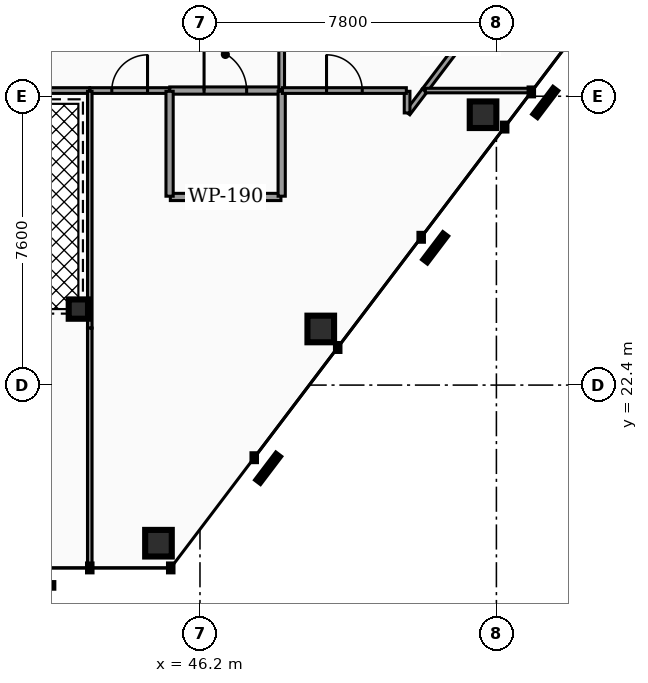
"""IFC4 building model, lengths in metres.
Left out: names, types, materials, properties, quantities, classifications, styles, units other than length and angle.
Written with IfcOpenShell. Run it as: python <this file> out.ifc"""

import sys

from ifc_helpers import new_model, si_unit, direction, frame, frame_2d, origin, origin_2d, place, context, subcontext, project, spatial, rectangle, hollow_rectangle, hollow_circle, extrude, element, fill, save


model = new_model("IFC4")
c1 = context("Model", 3, precision=1e-05, world=origin(), true_north=direction((0.0, 1.0)))
c2 = subcontext(c1, "Body", "Model", "MODEL_VIEW")
j1 = project(units=[si_unit("LENGTHUNIT", "METRE"), si_unit("PLANEANGLEUNIT", "RADIAN")], contexts=[c1])
p1 = place(None, origin())
s1 = spatial("IfcSite", under=j1, at=p1, CompositionType="ELEMENT")
p2 = place(p1, origin())
s2 = spatial("IfcBuilding", under=s1, at=p2, CompositionType="ELEMENT")
p3 = place(p2, frame((0.0, 0.0, 187.0)))
s3 = spatial("IfcBuildingStorey", under=s2, at=p3, CompositionType="ELEMENT", Elevation=187.0)
for number, where, z_axis, x_axis in (
    (1, (45.108, 18.239, 0.0), (0.0, 0.0, 1.0), (1.0, 0.0, 0.0)),
    (2, (49.378, 23.876, 0.0), (0.0, 0.0, 1.0), (1.0, 0.0, 0.0)),
    (3, (53.649, 29.514, 0.0), (0.0, 0.0, 1.0), (1.0, 0.0, 0.0)),
):
    element("IfcColumn", number, at=place(p3, frame(where, z_axis=z_axis, x_axis=x_axis)), inside=s3, PredefinedType="COLUMN", context=c2, shape_type="SweptSolid", body=[
        extrude(hollow_rectangle(XDim=0.7, YDim=0.7, WallThickness=0.035, at=origin_2d()), origin(), (0.0, 0.0, 1.0), 3.5),
    ])
p4 = place(p3, frame((43.0, 24.4, 0.0), z_axis=(0.0, 0.0, 1.0), x_axis=(1.0, 0.0, 0.0)))
e4 = element("IfcColumn", 4, at=p4, inside=s3, PredefinedType="COLUMN", context=c2, shape_type="SweptSolid", body=[
    extrude(hollow_circle(Radius=0.254, WallThickness=0.02, at=origin_2d()), origin(), (0.0, 0.0, 1.0), 3.5),
])
p5 = place(p3, frame((45.405, 30.15, 0.0), z_axis=(0.0, 0.0, 1.0), x_axis=(1.0, 0.0, 0.0)))
e5 = element("IfcWall", 5, at=p5, inside=s3, PredefinedType="PARTITIONING", context=c2, shape_type="SweptSolid", body=[
    extrude(rectangle(XDim=2.925, YDim=0.19, at=frame_2d((1.462, 0.0))), origin(), (0.0, 0.0, 1.0), 2.457),
])
p6 = place(p5, frame((0.903, 0.0, 0.0)))
e6 = element("IfcOpeningElement", 6, at=p6, cuts=e5, PredefinedType="OPENING", context=c2, shape_type="SweptSolid", body=[
    extrude(rectangle(XDim=1.12, YDim=2.05, at=frame_2d((0.56, 1.025))), frame((0.0, 0.105, 0.0), z_axis=(0.0, -1.0, 0.0), x_axis=(1.0, 0.0, 0.0)), (0.0, 0.0, 1.0), 0.21),
])
p7 = place(p3, frame((48.35, 30.17, 0.0), z_axis=(0.0, 0.0, 1.0), x_axis=(0.0, 1.0, 0.0)))
e7 = element("IfcWall", 7, at=p7, inside=s3, PredefinedType="PARTITIONING", context=c2, shape_type="SweptSolid", body=[
    extrude(rectangle(XDim=3.06, YDim=0.15, at=frame_2d((1.53, 0.0))), origin(), (0.0, 0.0, 1.0), 2.457),
])
p8 = place(p7, frame((1.06, 0.0, 0.0)))
e8 = element("IfcOpeningElement", 8, at=p8, cuts=e7, PredefinedType="OPENING", context=c2, shape_type="SweptSolid", body=[
    extrude(rectangle(XDim=0.94, YDim=2.05, at=frame_2d((0.47, 1.025))), frame((0.0, 0.085, 0.0), z_axis=(0.0, -1.0, 0.0), x_axis=(1.0, 0.0, 0.0)), (0.0, 0.0, 1.0), 0.17),
])
p9 = place(p3, frame((35.385, 30.15, 0.0), z_axis=(0.0, 0.0, 1.0), x_axis=(1.0, 0.0, 0.0)))
e9 = element("IfcWall", 9, at=p9, inside=s3, PredefinedType="PARTITIONING", context=c2, shape_type="SweptSolid", body=[
    extrude(rectangle(XDim=7.91, YDim=0.15, at=frame_2d((3.955, 0.0))), origin(), (0.0, 0.0, 1.0), 2.457),
])
p10 = place(p9, frame((0.25, 0.0, 0.0)))
e10 = element("IfcOpeningElement", 10, at=p10, cuts=e9, PredefinedType="OPENING", context=c2, shape_type="SweptSolid", body=[
    extrude(rectangle(XDim=0.88, YDim=2.05, at=frame_2d((0.44, 1.025))), frame((0.0, 0.085, 0.0), z_axis=(0.0, -1.0, 0.0), x_axis=(1.0, 0.0, 0.0)), (0.0, 0.0, 1.0), 0.17),
])
p11 = place(p3, frame((43.305, 30.15, 0.0), z_axis=(0.0, 0.0, 1.0), x_axis=(1.0, 0.0, 0.0)))
e11 = element("IfcWall", 11, at=p11, inside=s3, PredefinedType="PARTITIONING", context=c2, shape_type="SweptSolid", body=[
    extrude(rectangle(XDim=2.09, YDim=0.15, at=frame_2d((1.045, 0.0))), origin(), (0.0, 0.0, 1.0), 2.457),
])
p12 = place(p11, frame((0.575, 0.0, 0.0)))
e12 = element("IfcOpeningElement", 12, at=p12, cuts=e11, PredefinedType="OPENING", context=c2, shape_type="SweptSolid", body=[
    extrude(rectangle(XDim=0.94, YDim=2.05, at=frame_2d((0.47, 1.025))), frame((0.0, 0.085, 0.0), z_axis=(0.0, -1.0, 0.0), x_axis=(1.0, 0.0, 0.0)), (0.0, 0.0, 1.0), 0.17),
])
p13 = place(p3, frame((45.42, 27.35, 0.0), z_axis=(0.0, 0.0, 1.0), x_axis=(1.0, 0.0, 0.0)))
e13 = element("IfcWall", 13, at=p13, inside=s3, PredefinedType="PARTITIONING", context=c2, shape_type="SweptSolid", body=[
    extrude(rectangle(XDim=2.91, YDim=0.19, at=frame_2d((1.455, 0.0))), origin(), (0.0, 0.0, 1.0), 2.457),
])
for number, where, z_axis, x_axis in (
    (14, (45.4, 27.37, 0.0), (0.0, 0.0, 1.0), (0.0, 1.0, 0.0)),
    (15, (48.35, 27.37, 0.0), (0.0, 0.0, 1.0), (0.0, 1.0, 0.0)),
):
    element("IfcWall", number, at=place(p3, frame(where, z_axis=z_axis, x_axis=x_axis)), inside=s3, PredefinedType="PARTITIONING", context=c2, shape_type="SweptSolid", body=[
        extrude(rectangle(XDim=2.76, YDim=0.19, at=frame_2d((1.38, 0.0))), origin(), (0.0, 0.0, 1.0), 2.457),
    ])
p14 = place(p3, frame((51.662, 29.557, 0.0), z_axis=(0.0, 0.0, 1.0), x_axis=(0.603572672845, 0.797307988543, 0.0)))
e16 = element("IfcWall", 16, at=p14, inside=s3, PredefinedType="PARTITIONING", context=c2, shape_type="SweptSolid", body=[
    extrude(rectangle(XDim=0.742, YDim=0.15, at=frame_2d((0.371, 0.0))), origin(), (0.0, 0.0, 1.0), 2.457),
])
p15 = place(p3, frame((51.65, 29.562, 0.0), z_axis=(0.0, 0.0, 1.0), x_axis=(0.0, 1.0, 0.0)))
e17 = element("IfcWall", 17, at=p15, inside=s3, PredefinedType="PARTITIONING", context=c2, shape_type="SweptSolid", body=[
    extrude(rectangle(XDim=0.568, YDim=0.15, at=frame_2d((0.284, 0.0))), origin(), (0.0, 0.0, 1.0), 2.457),
])
p16 = place(p3, frame((48.37, 30.15, 0.0), z_axis=(0.0, 0.0, 1.0), x_axis=(1.0, 0.0, 0.0)))
e18 = element("IfcWall", 18, at=p16, inside=s3, PredefinedType="PARTITIONING", context=c2, shape_type="SweptSolid", body=[
    extrude(rectangle(XDim=3.26, YDim=0.15, at=frame_2d((1.63, 0.0))), origin(), (0.0, 0.0, 1.0), 2.457),
])
p17 = place(p16, frame((1.16, 0.0, 0.0)))
e19 = element("IfcOpeningElement", 19, at=p17, cuts=e18, PredefinedType="OPENING", context=c2, shape_type="SweptSolid", body=[
    extrude(rectangle(XDim=0.94, YDim=2.05, at=frame_2d((0.47, 1.025))), frame((0.0, 0.085, 0.0), z_axis=(0.0, -1.0, 0.0), x_axis=(1.0, 0.0, 0.0)), (0.0, 0.0, 1.0), 0.17),
])
p18 = place(p3, frame((52.114, 30.154, 0.0), z_axis=(0.0, 0.0, 1.0), x_axis=(0.603819819336, 0.797120835116, 0.0)))
e20 = element("IfcWall", 20, at=p18, inside=s3, PredefinedType="PARTITIONING", context=c2, shape_type="SweptSolid", body=[
    extrude(rectangle(XDim=3.103, YDim=0.15, at=frame_2d((1.552, 0.0))), origin(), (0.0, 0.0, 1.0), 2.457),
])
p19 = place(p3, frame((43.3, 23.9, 0.0), z_axis=(0.0, 0.0, 1.0), x_axis=(0.0, 1.0, 0.0)))
e21 = element("IfcWall", 21, at=p19, inside=s3, PredefinedType="PARTITIONING", context=c2, shape_type="SweptSolid", body=[
    extrude(rectangle(XDim=6.23, YDim=0.12, at=frame_2d((3.115, 0.0))), origin(), (0.0, 0.0, 1.0), 2.457),
])
p20 = place(p3, frame((43.3, 17.604, 0.0), z_axis=(0.0, 0.0, 1.0), x_axis=(0.0, 1.0, 0.0)))
e22 = element("IfcWall", 22, at=p20, inside=s3, PredefinedType="PARTITIONING", context=c2, shape_type="SweptSolid", body=[
    extrude(rectangle(XDim=6.295, YDim=0.12, at=frame_2d((3.148, 0.0))), origin(), (0.0, 0.0, 1.0), 2.457),
])
p21 = place(p3, frame((52.131, 30.15, 0.0), z_axis=(0.0, 0.0, 1.0), x_axis=(1.0, 0.0, 0.0)))
e23 = element("IfcWall", 23, at=p21, inside=s3, PredefinedType="PARTITIONING", context=c2, shape_type="SweptSolid", body=[
    extrude(rectangle(XDim=2.8, YDim=0.12, at=frame_2d((1.4, 0.0))), origin(), (0.0, 0.0, 1.0), 2.457),
])
p22 = place(p6, origin())
e24 = element("IfcDoor", 24, at=p22, inside=s3, OperationType="SINGLE_SWING_LEFT", PredefinedType="DOOR", context=c2, shape_type="SweptSolid", body=[
    extrude(rectangle(XDim=1.12, YDim=2.05, at=frame_2d((0.56, 1.025))), frame((0.0, 0.025, 0.0), z_axis=(0.0, -1.0, 0.0), x_axis=(1.0, 0.0, 0.0)), (0.0, 0.0, 1.0), 0.05),
])
fill(e6, e24)
p23 = place(p12, origin())
e25 = element("IfcDoor", 25, at=p23, inside=s3, OperationType="SINGLE_SWING_RIGHT", PredefinedType="DOOR", context=c2, shape_type="SweptSolid", body=[
    extrude(rectangle(XDim=0.94, YDim=2.05, at=frame_2d((0.47, 1.025))), frame((0.0, 0.025, 0.0), z_axis=(0.0, -1.0, 0.0), x_axis=(1.0, 0.0, 0.0)), (0.0, 0.0, 1.0), 0.05),
])
fill(e12, e25)
p24 = place(p17, origin())
e26 = element("IfcDoor", 26, at=p24, inside=s3, OperationType="SINGLE_SWING_LEFT", PredefinedType="DOOR", context=c2, shape_type="SweptSolid", body=[
    extrude(rectangle(XDim=0.94, YDim=2.05, at=frame_2d((0.47, 1.025))), frame((0.0, 0.025, 0.0), z_axis=(0.0, -1.0, 0.0), x_axis=(1.0, 0.0, 0.0)), (0.0, 0.0, 1.0), 0.05),
])
fill(e19, e26)
save(model, sys.argv[1])
